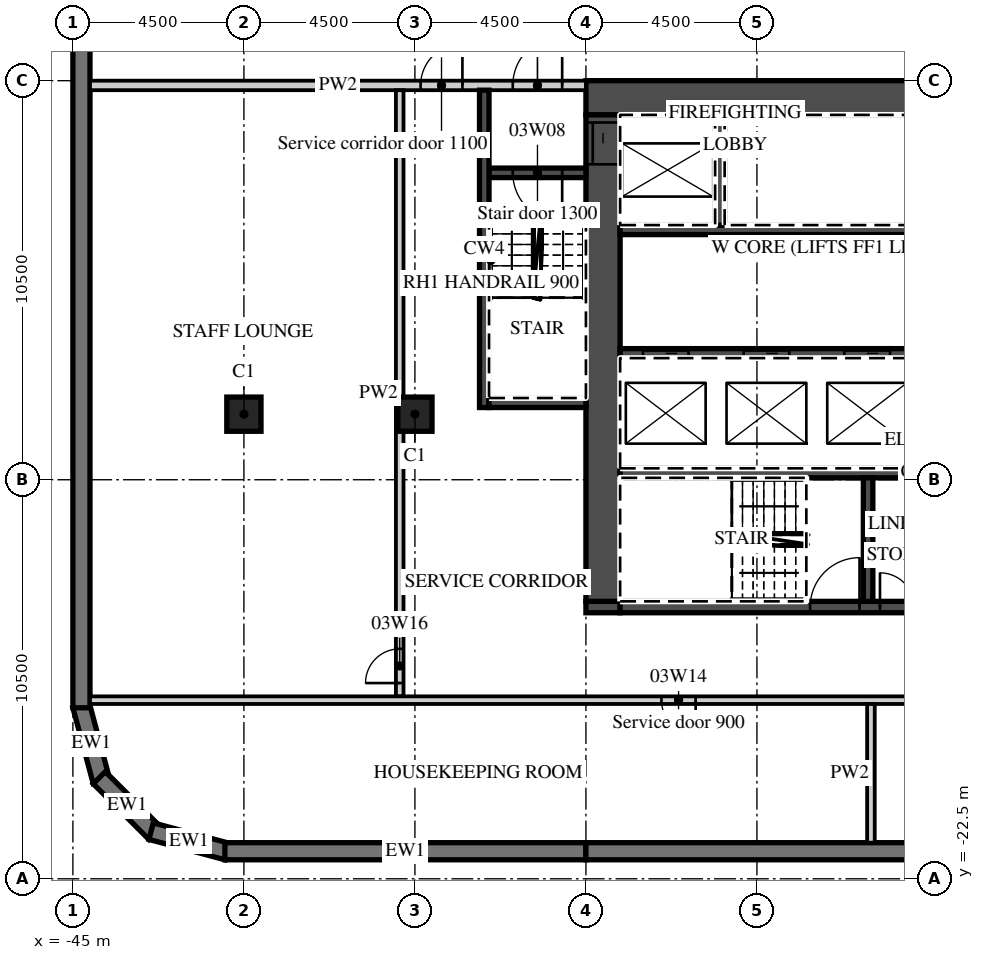
"""IFC4 building model, lengths in metres.
Left out: names, types, materials, properties, quantities, classifications, styles, units other than length and angle.
Written with IfcOpenShell. Run it as: python <this file> out.ifc"""

import sys

from ifc_helpers import new_model, si_unit, direction, frame, frame_2d, origin, origin_2d, place, context, subcontext, project, spatial, polyline, rectangle, outline, extrude, element, fill, save


model = new_model("IFC4")
c1 = context("Model", 3, precision=1e-05, world=origin(), true_north=direction((0.0, 1.0)))
c2 = subcontext(c1, "Body", "Model", "MODEL_VIEW")
j1 = project(units=[si_unit("LENGTHUNIT", "METRE"), si_unit("PLANEANGLEUNIT", "RADIAN")], contexts=[c1])
p1 = place(None, origin())
s1 = spatial("IfcSite", under=j1, at=p1, CompositionType="ELEMENT")
p2 = place(p1, origin())
s2 = spatial("IfcBuilding", under=s1, at=p2, CompositionType="ELEMENT")
p3 = place(p2, frame((0.0, 0.0, 23.5)))
s3 = spatial("IfcBuildingStorey", under=s2, at=p3, CompositionType="ELEMENT", Elevation=23.5)
for number, where, z_axis, x_axis in (
    (1, (-40.5, -10.275, 0.0), (0.0, 0.0, 1.0), (1.0, 0.0, 0.0)),
    (2, (-36.0, -10.275, 0.0), (0.0, 0.0, 1.0), (1.0, 0.0, 0.0)),
):
    element("IfcColumn", number, at=place(p3, frame(where, z_axis=z_axis, x_axis=x_axis)), inside=s3, PredefinedType="COLUMN", context=c2, shape_type="SweptSolid", body=[
        extrude(rectangle(XDim=0.9, YDim=0.9, at=origin_2d()), origin(), (0.0, 0.0, 1.0), 5.5),
    ])
p4 = place(p3, frame((-44.783, -17.942, 0.0), z_axis=(0.0, 0.0, 1.0), x_axis=(0.25881466832, -0.965926999034, 0.0)))
e3 = element("IfcWall", 3, at=p4, inside=s3, PredefinedType="SOLIDWALL", context=c2, shape_type="SweptSolid", body=[
    extrude(outline(polyline([(0.0, -0.225), (2.071, -0.225), (1.95, 0.225), (0.121, 0.225), (0.0, -0.225)])), origin(), (0.0, 0.0, 1.0), 5.05),
])
p5 = place(p3, frame((-44.305, -19.841, 0.0), z_axis=(0.0, 0.0, 1.0), x_axis=(0.707106781187, -0.707106781187, 0.0)))
e4 = element("IfcWall", 4, at=p5, inside=s3, PredefinedType="SOLIDWALL", context=c2, shape_type="SweptSolid", body=[
    extrude(outline(polyline([(0.0, -0.225), (2.071, -0.225), (1.95, 0.225), (0.121, 0.225), (0.0, -0.225)])), origin(), (0.0, 0.0, 1.0), 5.05),
])
p6 = place(p3, frame((-42.942, -21.247, 0.0), z_axis=(0.0, 0.0, 1.0), x_axis=(0.965926999034, -0.25881466832, 0.0)))
e5 = element("IfcWall", 5, at=p6, inside=s3, PredefinedType="SOLIDWALL", context=c2, shape_type="SweptSolid", body=[
    extrude(outline(polyline([(-0.0, -0.225), (2.07, -0.225), (1.95, 0.225), (0.12, 0.225), (-0.0, -0.225)])), origin(), (0.0, 0.0, 1.0), 5.05),
])
p7 = place(p3, frame((-41.0, -21.775, 0.0), z_axis=(0.0, 0.0, 1.0), x_axis=(1.0, 0.0, 0.0)))
e6 = element("IfcWall", 6, at=p7, inside=s3, PredefinedType="SOLIDWALL", context=c2, shape_type="SweptSolid", body=[
    extrude(rectangle(XDim=9.5, YDim=0.45, at=frame_2d((4.75, 0.0))), origin(), (0.0, 0.0, 1.0), 5.05),
])
p8 = place(p3, frame((-31.5, -21.775, 0.0), z_axis=(0.0, 0.0, 1.0), x_axis=(1.0, 0.0, 0.0)))
e7 = element("IfcWall", 7, at=p8, inside=s3, PredefinedType="SOLIDWALL", context=c2, shape_type="SweptSolid", body=[
    extrude(rectangle(XDim=18.0, YDim=0.45, at=frame_2d((9.0, 0.0))), origin(), (0.0, 0.0, 1.0), 5.05),
])
p9 = place(p3, frame((-44.775, 18.0, 0.0), z_axis=(0.0, 0.0, 1.0), x_axis=(0.0, -1.0, 0.0)))
e8 = element("IfcWall", 8, at=p9, inside=s3, PredefinedType="SOLIDWALL", context=c2, shape_type="SweptSolid", body=[
    extrude(rectangle(XDim=36.0, YDim=0.45, at=frame_2d((18.0, 0.0))), origin(), (0.0, 0.0, 1.0), 5.05),
])
p10 = place(p9, frame((4.05, 0.0, 0.9)))
e9 = element("IfcOpeningElement", 9, at=p10, cuts=e8, PredefinedType="OPENING", context=c2, shape_type="SweptSolid", body=[
    extrude(rectangle(XDim=3.0, YDim=1.8, at=frame_2d((1.5, 0.9))), frame((0.0, 0.235, 0.0), z_axis=(0.0, -1.0, 0.0), x_axis=(1.0, 0.0, 0.0)), (0.0, 0.0, 1.0), 0.47),
])
p11 = place(p3, frame((-31.5, -1.95, 0.0), z_axis=(0.0, 0.0, 1.0), x_axis=(1.0, 0.0, 0.0)))
e10 = element("IfcWall", 10, at=p11, inside=s3, PredefinedType="SHEAR", context=c2, shape_type="SweptSolid", body=[
    extrude(rectangle(XDim=18.0, YDim=0.9, at=frame_2d((9.0, 0.0))), origin(), (0.0, 0.0, 1.0), 5.05),
])
p12 = place(p11, frame((14.725, 0.0, 0.0)))
e11 = element("IfcOpeningElement", 11, at=p12, cuts=e10, PredefinedType="OPENING", context=c2, shape_type="SweptSolid", body=[
    extrude(rectangle(XDim=1.8, YDim=2.1, at=frame_2d((0.9, 1.05))), frame((0.0, 0.46, 0.0), z_axis=(0.0, -1.0, 0.0), x_axis=(1.0, 0.0, 0.0)), (0.0, 0.0, 1.0), 0.92),
])
p13 = place(p3, frame((-31.5, -15.35, 0.0), z_axis=(0.0, 0.0, 1.0), x_axis=(1.0, 0.0, 0.0)))
e12 = element("IfcWall", 12, at=p13, inside=s3, PredefinedType="SHEAR", context=c2, shape_type="SweptSolid", body=[
    extrude(rectangle(XDim=0.9, YDim=0.3, at=frame_2d((0.45, 0.0))), origin(), (0.0, 0.0, 1.0), 5.05),
])
p14 = place(p3, frame((-30.6, -15.35, 0.0), z_axis=(0.0, 0.0, 1.0), x_axis=(1.0, 0.0, 0.0)))
e13 = element("IfcWall", 13, at=p14, inside=s3, PredefinedType="SHEAR", context=c2, shape_type="SweptSolid", body=[
    extrude(rectangle(XDim=10.3, YDim=0.3, at=frame_2d((5.15, 0.0))), origin(), (0.0, 0.0, 1.0), 5.05),
])
p15 = place(p14, frame((5.0, 0.0, 0.0)))
e14 = element("IfcOpeningElement", 14, at=p15, cuts=e13, PredefinedType="OPENING", context=c2, shape_type="SweptSolid", body=[
    extrude(rectangle(XDim=1.3, YDim=2.1, at=frame_2d((0.65, 1.05))), frame((0.0, 0.16, 0.0), z_axis=(0.0, -1.0, 0.0), x_axis=(1.0, 0.0, 0.0)), (0.0, 0.0, 1.0), 0.32),
])
p16 = place(p14, frame((6.837, 0.0, 0.0)))
e15 = element("IfcOpeningElement", 15, at=p16, cuts=e13, PredefinedType="OPENING", context=c2, shape_type="SweptSolid", body=[
    extrude(rectangle(XDim=0.9, YDim=2.1, at=frame_2d((0.45, 1.05))), frame((0.0, 0.16, 0.0), z_axis=(0.0, -1.0, 0.0), x_axis=(1.0, 0.0, 0.0)), (0.0, 0.0, 1.0), 0.32),
])
p17 = place(p14, frame((8.663, 0.0, 0.0)))
e16 = element("IfcOpeningElement", 16, at=p17, cuts=e13, PredefinedType="OPENING", context=c2, shape_type="SweptSolid", body=[
    extrude(rectangle(XDim=0.9, YDim=2.1, at=frame_2d((0.45, 1.05))), frame((0.0, 0.16, 0.0), z_axis=(0.0, -1.0, 0.0), x_axis=(1.0, 0.0, 0.0)), (0.0, 0.0, 1.0), 0.32),
])
p18 = place(p3, frame((-31.05, -15.2, 0.0), z_axis=(0.0, 0.0, 1.0), x_axis=(0.0, 1.0, 0.0)))
e17 = element("IfcWall", 17, at=p18, inside=s3, PredefinedType="SHEAR", context=c2, shape_type="SweptSolid", body=[
    extrude(rectangle(XDim=12.8, YDim=0.9, at=frame_2d((6.4, 0.0))), origin(), (0.0, 0.0, 1.0), 5.05),
])
p19 = place(p18, frame((11.5, 0.0, 0.0)))
e18 = element("IfcOpeningElement", 18, at=p19, cuts=e17, PredefinedType="OPENING", context=c2, shape_type="SweptSolid", body=[
    extrude(rectangle(XDim=1.1, YDim=2.1, at=frame_2d((0.55, 1.05))), frame((0.0, 0.46, 0.0), z_axis=(0.0, -1.0, 0.0), x_axis=(1.0, 0.0, 0.0)), (0.0, 0.0, 1.0), 0.92),
])
p20 = place(p3, frame((-30.6, -5.425, 0.0), z_axis=(0.0, 0.0, 1.0), x_axis=(1.0, 0.0, 0.0)))
e19 = element("IfcWall", 19, at=p20, inside=s3, PredefinedType="SHEAR", context=c2, shape_type="SweptSolid", body=[
    extrude(rectangle(XDim=13.0, YDim=0.25, at=frame_2d((6.5, 0.0))), origin(), (0.0, 0.0, 1.0), 5.05),
])
p21 = place(p3, frame((-27.975, -5.3, 0.0), z_axis=(0.0, 0.0, 1.0), x_axis=(0.0, 1.0, 0.0)))
e20 = element("IfcWall", 20, at=p21, inside=s3, PredefinedType="SHEAR", context=c2, shape_type="SweptSolid", body=[
    extrude(rectangle(XDim=2.9, YDim=0.25, at=frame_2d((1.45, 0.0))), origin(), (0.0, 0.0, 1.0), 5.05),
])
p22 = place(p3, frame((-30.6, -8.675, 0.0), z_axis=(0.0, 0.0, 1.0), x_axis=(1.0, 0.0, 0.0)))
e21 = element("IfcWall", 21, at=p22, inside=s3, PredefinedType="SHEAR", context=c2, shape_type="SweptSolid", body=[
    extrude(rectangle(XDim=16.2, YDim=0.25, at=frame_2d((8.1, 0.0))), origin(), (0.0, 0.0, 1.0), 5.05),
])
p23 = place(p22, frame((0.6, 0.0, 0.0)))
e22 = element("IfcOpeningElement", 22, at=p23, cuts=e21, PredefinedType="OPENING", context=c2, shape_type="SweptSolid", body=[
    extrude(rectangle(XDim=1.2, YDim=2.1, at=frame_2d((0.6, 1.05))), frame((0.0, 0.135, 0.0), z_axis=(0.0, -1.0, 0.0), x_axis=(1.0, 0.0, 0.0)), (0.0, 0.0, 1.0), 0.27),
])
p24 = place(p22, frame((3.25, 0.0, 0.0)))
e23 = element("IfcOpeningElement", 23, at=p24, cuts=e21, PredefinedType="OPENING", context=c2, shape_type="SweptSolid", body=[
    extrude(rectangle(XDim=1.2, YDim=2.1, at=frame_2d((0.6, 1.05))), frame((0.0, 0.135, 0.0), z_axis=(0.0, -1.0, 0.0), x_axis=(1.0, 0.0, 0.0)), (0.0, 0.0, 1.0), 0.27),
])
p25 = place(p22, frame((5.9, 0.0, 0.0)))
e24 = element("IfcOpeningElement", 24, at=p25, cuts=e21, PredefinedType="OPENING", context=c2, shape_type="SweptSolid", body=[
    extrude(rectangle(XDim=1.2, YDim=2.1, at=frame_2d((0.6, 1.05))), frame((0.0, 0.135, 0.0), z_axis=(0.0, -1.0, 0.0), x_axis=(1.0, 0.0, 0.0)), (0.0, 0.0, 1.0), 0.27),
])
p26 = place(p22, frame((14.25, 0.0, 0.0)))
e25 = element("IfcOpeningElement", 25, at=p26, cuts=e21, PredefinedType="OPENING", context=c2, shape_type="SweptSolid", body=[
    extrude(rectangle(XDim=1.3, YDim=2.1, at=frame_2d((0.65, 1.05))), frame((0.0, 0.135, 0.0), z_axis=(0.0, -1.0, 0.0), x_axis=(1.0, 0.0, 0.0)), (0.0, 0.0, 1.0), 0.27),
])
p27 = place(p3, frame((-30.6, -11.825, 0.0), z_axis=(0.0, 0.0, 1.0), x_axis=(1.0, 0.0, 0.0)))
e26 = element("IfcWall", 26, at=p27, inside=s3, PredefinedType="SHEAR", context=c2, shape_type="SweptSolid", body=[
    extrude(rectangle(XDim=13.25, YDim=0.25, at=frame_2d((6.625, 0.0))), origin(), (0.0, 0.0, 1.0), 5.05),
])
p28 = place(p3, frame((-24.075, -15.2, 0.0), z_axis=(0.0, 0.0, 1.0), x_axis=(0.0, 1.0, 0.0)))
e27 = element("IfcWall", 27, at=p28, inside=s3, PredefinedType="SHEAR", context=c2, shape_type="SweptSolid", body=[
    extrude(rectangle(XDim=3.25, YDim=0.25, at=frame_2d((1.625, 0.0))), origin(), (0.0, 0.0, 1.0), 5.05),
])
p29 = place(p3, frame((-44.55, -1.625, 0.0), z_axis=(0.0, 0.0, 1.0), x_axis=(1.0, 0.0, 0.0)))
e28 = element("IfcWall", 28, at=p29, inside=s3, PredefinedType="PARTITIONING", context=c2, shape_type="SweptSolid", body=[
    extrude(rectangle(XDim=13.05, YDim=0.25, at=frame_2d((6.525, 0.0))), origin(), (0.0, 0.0, 1.0), 5.05),
])
p30 = place(p29, frame((11.125, 0.0, 0.0)))
e29 = element("IfcOpeningElement", 29, at=p30, cuts=e28, PredefinedType="OPENING", context=c2, shape_type="SweptSolid", body=[
    extrude(rectangle(XDim=1.3, YDim=2.1, at=frame_2d((0.65, 1.05))), frame((0.0, 0.135, 0.0), z_axis=(0.0, -1.0, 0.0), x_axis=(1.0, 0.0, 0.0)), (0.0, 0.0, 1.0), 0.27),
])
p31 = place(p29, frame((8.7, 0.0, 0.0)))
e30 = element("IfcOpeningElement", 30, at=p31, cuts=e28, PredefinedType="OPENING", context=c2, shape_type="SweptSolid", body=[
    extrude(rectangle(XDim=1.1, YDim=2.1, at=frame_2d((0.55, 1.05))), frame((0.0, 0.135, 0.0), z_axis=(0.0, -1.0, 0.0), x_axis=(1.0, 0.0, 0.0)), (0.0, 0.0, 1.0), 0.27),
])
p32 = place(p3, frame((-34.05, -3.925, 0.0), z_axis=(0.0, 0.0, 1.0), x_axis=(1.0, 0.0, 0.0)))
e31 = element("IfcWall", 31, at=p32, inside=s3, PredefinedType="SHEAR", context=c2, shape_type="SweptSolid", body=[
    extrude(rectangle(XDim=2.55, YDim=0.25, at=frame_2d((1.275, 0.0))), origin(), (0.0, 0.0, 1.0), 5.05),
])
p33 = place(p32, frame((0.625, 0.0, 0.0)))
e32 = element("IfcOpeningElement", 32, at=p33, cuts=e31, PredefinedType="OPENING", context=c2, shape_type="SweptSolid", body=[
    extrude(rectangle(XDim=1.3, YDim=2.1, at=frame_2d((0.65, 1.05))), frame((0.0, 0.135, 0.0), z_axis=(0.0, -1.0, 0.0), x_axis=(1.0, 0.0, 0.0)), (0.0, 0.0, 1.0), 0.27),
])
p34 = place(p3, frame((-34.175, -10.1, 0.0), z_axis=(0.0, 0.0, 1.0), x_axis=(0.0, 1.0, 0.0)))
e33 = element("IfcWall", 33, at=p34, inside=s3, PredefinedType="SHEAR", context=c2, shape_type="SweptSolid", body=[
    extrude(rectangle(XDim=8.35, YDim=0.25, at=frame_2d((4.175, 0.0))), origin(), (0.0, 0.0, 1.0), 5.05),
])
p35 = place(p3, frame((-34.05, -9.975, 0.0), z_axis=(0.0, 0.0, 1.0), x_axis=(1.0, 0.0, 0.0)))
e34 = element("IfcWall", 34, at=p35, inside=s3, PredefinedType="SHEAR", context=c2, shape_type="SweptSolid", body=[
    extrude(rectangle(XDim=2.55, YDim=0.25, at=frame_2d((1.275, 0.0))), origin(), (0.0, 0.0, 1.0), 5.05),
])
p36 = place(p3, frame((-36.4, -17.7, 0.0), z_axis=(0.0, 0.0, 1.0), x_axis=(0.0, 1.0, 0.0)))
e35 = element("IfcWall", 35, at=p36, inside=s3, PredefinedType="PARTITIONING", context=c2, shape_type="SweptSolid", body=[
    extrude(rectangle(XDim=15.95, YDim=0.2, at=frame_2d((7.975, 0.0))), origin(), (0.0, 0.0, 1.0), 5.05),
])
p37 = place(p36, frame((0.35, 0.0, 0.0)))
e36 = element("IfcOpeningElement", 36, at=p37, cuts=e35, PredefinedType="OPENING", context=c2, shape_type="SweptSolid", body=[
    extrude(rectangle(XDim=0.9, YDim=2.1, at=frame_2d((0.45, 1.05))), frame((0.0, 0.11, 0.0), z_axis=(0.0, -1.0, 0.0), x_axis=(1.0, 0.0, 0.0)), (0.0, 0.0, 1.0), 0.22),
])
p38 = place(p3, frame((-44.55, -17.8, 0.0), z_axis=(0.0, 0.0, 1.0), x_axis=(1.0, 0.0, 0.0)))
e37 = element("IfcWall", 37, at=p38, inside=s3, PredefinedType="PARTITIONING", context=c2, shape_type="SweptSolid", body=[
    extrude(rectangle(XDim=30.95, YDim=0.2, at=frame_2d((15.475, 0.0))), origin(), (0.0, 0.0, 1.0), 5.05),
])
p39 = place(p38, frame((15.038, 0.0, 0.0)))
e38 = element("IfcOpeningElement", 38, at=p39, cuts=e37, PredefinedType="OPENING", context=c2, shape_type="SweptSolid", body=[
    extrude(rectangle(XDim=0.9, YDim=2.1, at=frame_2d((0.45, 1.05))), frame((0.0, 0.11, 0.0), z_axis=(0.0, -1.0, 0.0), x_axis=(1.0, 0.0, 0.0)), (0.0, 0.0, 1.0), 0.22),
])
p40 = place(p38, frame((23.337, 0.0, 0.0)))
e39 = element("IfcOpeningElement", 39, at=p40, cuts=e37, PredefinedType="OPENING", context=c2, shape_type="SweptSolid", body=[
    extrude(rectangle(XDim=0.9, YDim=2.1, at=frame_2d((0.45, 1.05))), frame((0.0, 0.11, 0.0), z_axis=(0.0, -1.0, 0.0), x_axis=(1.0, 0.0, 0.0)), (0.0, 0.0, 1.0), 0.22),
])
p41 = place(p3, frame((-24.0, -21.55, 0.0), z_axis=(0.0, 0.0, 1.0), x_axis=(0.0, 1.0, 0.0)))
e40 = element("IfcWall", 40, at=p41, inside=s3, PredefinedType="PARTITIONING", context=c2, shape_type="SweptSolid", body=[
    extrude(rectangle(XDim=3.65, YDim=0.2, at=frame_2d((1.825, 0.0))), origin(), (0.0, 0.0, 1.0), 5.05),
])
p42 = place(p23, origin())
e41 = element("IfcDoor", 41, at=p42, inside=s3, OperationType="SLIDING_TO_LEFT", PredefinedType="DOOR", context=c2, shape_type="SweptSolid", body=[
    extrude(rectangle(XDim=1.2, YDim=2.1, at=frame_2d((0.6, 1.05))), frame((0.0, 0.025, 0.0), z_axis=(0.0, -1.0, 0.0), x_axis=(1.0, 0.0, 0.0)), (0.0, 0.0, 1.0), 0.05),
])
fill(e22, e41)
p43 = place(p24, origin())
e42 = element("IfcDoor", 42, at=p43, inside=s3, OperationType="SLIDING_TO_RIGHT", PredefinedType="DOOR", context=c2, shape_type="SweptSolid", body=[
    extrude(rectangle(XDim=1.2, YDim=2.1, at=frame_2d((0.6, 1.05))), frame((0.0, 0.025, 0.0), z_axis=(0.0, -1.0, 0.0), x_axis=(1.0, 0.0, 0.0)), (0.0, 0.0, 1.0), 0.05),
])
fill(e23, e42)
p44 = place(p25, origin())
e43 = element("IfcDoor", 43, at=p44, inside=s3, OperationType="SLIDING_TO_RIGHT", PredefinedType="DOOR", context=c2, shape_type="SweptSolid", body=[
    extrude(rectangle(XDim=1.2, YDim=2.1, at=frame_2d((0.6, 1.05))), frame((0.0, 0.025, 0.0), z_axis=(0.0, -1.0, 0.0), x_axis=(1.0, 0.0, 0.0)), (0.0, 0.0, 1.0), 0.05),
])
fill(e24, e43)
p45 = place(p19, origin())
e44 = element("IfcDoor", 44, at=p45, inside=s3, OperationType="SLIDING_TO_RIGHT", PredefinedType="DOOR", context=c2, shape_type="SweptSolid", body=[
    extrude(rectangle(XDim=1.1, YDim=2.1, at=frame_2d((0.55, 1.05))), frame((0.0, 0.025, 0.0), z_axis=(0.0, -1.0, 0.0), x_axis=(1.0, 0.0, 0.0)), (0.0, 0.0, 1.0), 0.05),
])
fill(e18, e44)
p46 = place(p30, origin())
e45 = element("IfcDoor", 45, at=p46, inside=s3, OperationType="SINGLE_SWING_RIGHT", PredefinedType="DOOR", context=c2, shape_type="SweptSolid", body=[
    extrude(rectangle(XDim=1.3, YDim=2.1, at=frame_2d((0.65, 1.05))), frame((0.0, 0.025, 0.0), z_axis=(0.0, -1.0, 0.0), x_axis=(1.0, 0.0, 0.0)), (0.0, 0.0, 1.0), 0.05),
])
fill(e29, e45)
p47 = place(p33, origin())
e46 = element("IfcDoor", 46, at=p47, inside=s3, OperationType="SINGLE_SWING_RIGHT", PredefinedType="DOOR", context=c2, shape_type="SweptSolid", body=[
    extrude(rectangle(XDim=1.3, YDim=2.1, at=frame_2d((0.65, 1.05))), frame((0.0, 0.025, 0.0), z_axis=(0.0, -1.0, 0.0), x_axis=(1.0, 0.0, 0.0)), (0.0, 0.0, 1.0), 0.05),
])
fill(e32, e46)
p48 = place(p31, origin())
e47 = element("IfcDoor", 47, at=p48, inside=s3, OperationType="SINGLE_SWING_RIGHT", PredefinedType="DOOR", context=c2, shape_type="SweptSolid", body=[
    extrude(rectangle(XDim=1.1, YDim=2.1, at=frame_2d((0.55, 1.05))), frame((0.0, 0.025, 0.0), z_axis=(0.0, -1.0, 0.0), x_axis=(1.0, 0.0, 0.0)), (0.0, 0.0, 1.0), 0.05),
])
fill(e30, e47)
p49 = place(p15, origin())
e48 = element("IfcDoor", 48, at=p49, inside=s3, OperationType="SINGLE_SWING_RIGHT", PredefinedType="DOOR", context=c2, shape_type="SweptSolid", body=[
    extrude(rectangle(XDim=1.3, YDim=2.1, at=frame_2d((0.65, 1.05))), frame((0.0, 0.025, 0.0), z_axis=(0.0, -1.0, 0.0), x_axis=(1.0, 0.0, 0.0)), (0.0, 0.0, 1.0), 0.05),
])
fill(e14, e48)
p50 = place(p16, origin())
e49 = element("IfcDoor", 49, at=p50, inside=s3, OperationType="SINGLE_SWING_LEFT", PredefinedType="DOOR", context=c2, shape_type="SweptSolid", body=[
    extrude(rectangle(XDim=0.9, YDim=2.1, at=frame_2d((0.45, 1.05))), frame((0.0, 0.025, 0.0), z_axis=(0.0, -1.0, 0.0), x_axis=(1.0, 0.0, 0.0)), (0.0, 0.0, 1.0), 0.05),
])
fill(e15, e49)
p51 = place(p39, origin())
e50 = element("IfcDoor", 50, at=p51, inside=s3, OperationType="SINGLE_SWING_RIGHT", PredefinedType="DOOR", context=c2, shape_type="SweptSolid", body=[
    extrude(rectangle(XDim=0.9, YDim=2.1, at=frame_2d((0.45, 1.05))), frame((0.0, 0.025, 0.0), z_axis=(0.0, -1.0, 0.0), x_axis=(1.0, 0.0, 0.0)), (0.0, 0.0, 1.0), 0.05),
])
fill(e38, e50)
p52 = place(p37, origin())
e51 = element("IfcDoor", 51, at=p52, inside=s3, OperationType="SINGLE_SWING_LEFT", PredefinedType="DOOR", context=c2, shape_type="SweptSolid", body=[
    extrude(rectangle(XDim=0.9, YDim=2.1, at=frame_2d((0.45, 1.05))), frame((0.0, 0.025, 0.0), z_axis=(0.0, -1.0, 0.0), x_axis=(1.0, 0.0, 0.0)), (0.0, 0.0, 1.0), 0.05),
])
fill(e36, e51)
save(model, sys.argv[1])
